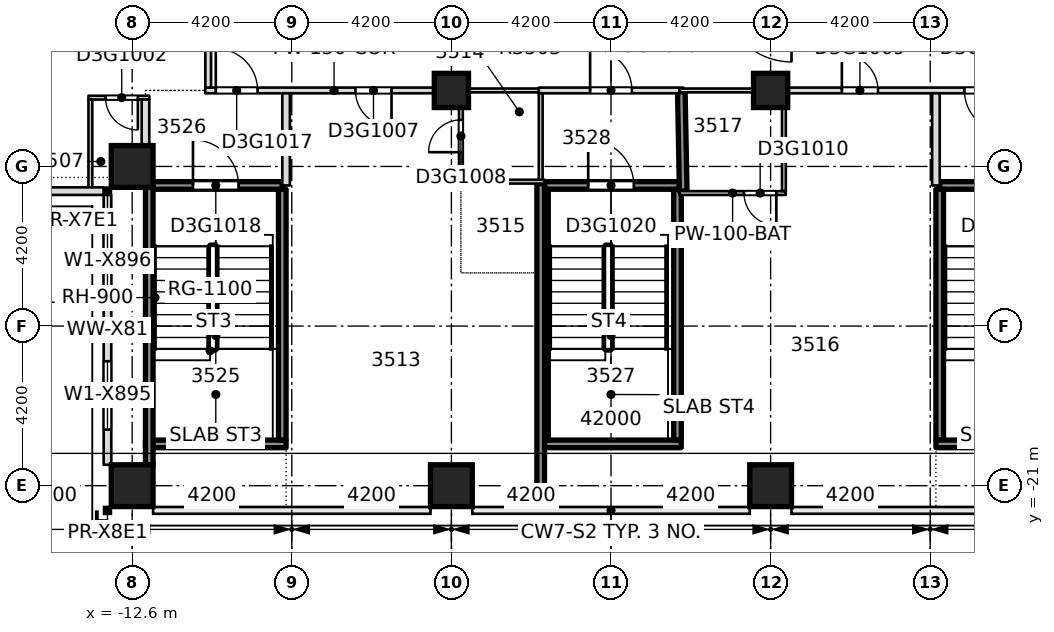
"""IFC4 building model, lengths in metres.
Left out: names, types, materials, properties, quantities, classifications, styles, units other than length and angle.
Written with IfcOpenShell. Run it as: python <this file> out.ifc"""

import sys

from ifc_helpers import new_model, si_unit, direction, frame, frame_2d, origin, origin_2d, place, context, subcontext, project, spatial, rectangle, extrude, element, fill, save


model = new_model("IFC4")
c1 = context("Model", 3, precision=1e-05, world=origin(), true_north=direction((0.0, 1.0)))
c2 = subcontext(c1, "Body", "Model", "MODEL_VIEW")
j1 = project(units=[si_unit("LENGTHUNIT", "METRE"), si_unit("PLANEANGLEUNIT", "RADIAN")], contexts=[c1])
p1 = place(None, origin())
s1 = spatial("IfcSite", under=j1, at=p1, CompositionType="ELEMENT")
p2 = place(p1, origin())
s2 = spatial("IfcBuilding", under=s1, at=p2, CompositionType="ELEMENT")
p3 = place(p2, frame((0.0, 0.0, 140.0)))
s3 = spatial("IfcBuildingStorey", under=s2, at=p3, CompositionType="ELEMENT", Elevation=140.0)
for number, where, z_axis, x_axis in (
    (1, (-12.6, -21.0, -0.4), (0.0, 0.0, 1.0), (1.0, 0.0, 0.0)),
    (2, (-4.2, -21.0, -0.4), (0.0, 0.0, 1.0), (1.0, 0.0, 0.0)),
    (3, (4.2, -21.0, -0.4), (0.0, 0.0, 1.0), (1.0, 0.0, 0.0)),
    (4, (-12.6, -12.6, -0.4), (0.0, 0.0, 1.0), (1.0, 0.0, 0.0)),
):
    element("IfcColumn", number, at=place(p3, frame(where, z_axis=z_axis, x_axis=x_axis)), inside=s3, PredefinedType="COLUMN", context=c2, shape_type="SweptSolid", body=[
        extrude(rectangle(XDim=1.1, YDim=1.1, at=origin_2d()), origin(), (0.0, 0.0, 1.0), 3.45),
    ])
for number, where, z_axis, x_axis in (
    (5, (-4.2, -10.6, -0.4), (0.0, 0.0, 1.0), (1.0, 0.0, 0.0)),
    (6, (4.2, -10.6, -0.4), (0.0, 0.0, 1.0), (1.0, 0.0, 0.0)),
):
    element("IfcColumn", number, at=place(p3, frame(where, z_axis=z_axis, x_axis=x_axis)), inside=s3, PredefinedType="COLUMN", context=c2, shape_type="SweptSolid", body=[
        extrude(rectangle(XDim=0.9, YDim=0.9, at=origin_2d()), origin(), (0.0, 0.0, 1.0), 3.45),
    ])
p4 = place(p3, frame((-1.848, -19.9, 0.0), z_axis=(0.0, 0.0, 1.0), x_axis=(1.0, 0.0, 0.0)))
e7 = element("IfcWall", 7, at=p4, inside=s3, PredefinedType="SOLIDWALL", context=c2, shape_type="SweptSolid", body=[
    extrude(rectangle(XDim=3.696, YDim=0.2, at=frame_2d((1.848, 0.0))), origin(), (0.0, 0.0, 1.0), 3.05),
])
p5 = place(p3, frame((1.802, -13.3, 0.0), z_axis=(0.0, 0.0, 1.0), x_axis=(1.0, 0.0, 0.0)))
e8 = element("IfcWall", 8, at=p5, inside=s3, PredefinedType="PARTITIONING", context=c2, shape_type="SweptSolid", body=[
    extrude(rectangle(XDim=2.796, YDim=0.1, at=frame_2d((1.398, 0.0))), origin(), (0.0, 0.0, 1.0), 3.05),
])
p6 = place(p5, frame((1.698, 0.0, 0.0)))
e9 = element("IfcOpeningElement", 9, at=p6, cuts=e8, PredefinedType="OPENING", context=c2, shape_type="SweptSolid", body=[
    extrude(rectangle(XDim=0.85, YDim=2.1, at=frame_2d((0.425, 1.05))), frame((0.0, 0.06, 0.0), z_axis=(0.0, -1.0, 0.0), x_axis=(1.0, 0.0, 0.0)), (0.0, 0.0, 1.0), 0.12),
])
p7 = place(p3, frame((-12.15, -13.1, 0.0), z_axis=(0.0, 0.0, 1.0), x_axis=(1.0, 0.0, 0.0)))
e10 = element("IfcWall", 10, at=p7, inside=s3, PredefinedType="SOLIDWALL", context=c2, shape_type="SweptSolid", body=[
    extrude(rectangle(XDim=3.5, YDim=0.2, at=frame_2d((1.75, 0.0))), origin(), (0.0, 0.0, 1.0), 3.05),
])
p8 = place(p7, frame((1.15, 0.0, 0.0)))
e11 = element("IfcOpeningElement", 11, at=p8, cuts=e10, PredefinedType="OPENING", context=c2, shape_type="SweptSolid", body=[
    extrude(rectangle(XDim=1.2, YDim=2.1, at=frame_2d((0.6, 1.05))), frame((0.0, 0.11, 0.0), z_axis=(0.0, -1.0, 0.0), x_axis=(1.0, 0.0, 0.0)), (0.0, 0.0, 1.0), 0.22),
])
p9 = place(p3, frame((-1.748, -13.1, 0.0), z_axis=(0.0, 0.0, 1.0), x_axis=(1.0, 0.0, 0.0)))
e12 = element("IfcWall", 12, at=p9, inside=s3, PredefinedType="SOLIDWALL", context=c2, shape_type="SweptSolid", body=[
    extrude(rectangle(XDim=3.546, YDim=0.2, at=frame_2d((1.773, 0.0))), origin(), (0.0, 0.0, 1.0), 3.05),
])
p10 = place(p9, frame((1.148, 0.0, 0.0)))
e13 = element("IfcOpeningElement", 13, at=p10, cuts=e12, PredefinedType="OPENING", context=c2, shape_type="SweptSolid", body=[
    extrude(rectangle(XDim=1.2, YDim=2.1, at=frame_2d((0.6, 1.05))), frame((0.0, 0.11, 0.0), z_axis=(0.0, -1.0, 0.0), x_axis=(1.0, 0.0, 0.0)), (0.0, 0.0, 1.0), 0.22),
])
p11 = place(p3, frame((8.65, -13.1, 0.0), z_axis=(0.0, 0.0, 1.0), x_axis=(1.0, 0.0, 0.0)))
e14 = element("IfcWall", 14, at=p11, inside=s3, PredefinedType="SOLIDWALL", context=c2, shape_type="SweptSolid", body=[
    extrude(rectangle(XDim=3.5, YDim=0.2, at=frame_2d((1.75, 0.0))), origin(), (0.0, 0.0, 1.0), 3.05),
])
p12 = place(p11, frame((1.15, 0.0, 0.0)))
e15 = element("IfcOpeningElement", 15, at=p12, cuts=e14, PredefinedType="OPENING", context=c2, shape_type="SweptSolid", body=[
    extrude(rectangle(XDim=1.2, YDim=2.1, at=frame_2d((0.6, 1.05))), frame((0.0, 0.11, 0.0), z_axis=(0.0, -1.0, 0.0), x_axis=(1.0, 0.0, 0.0)), (0.0, 0.0, 1.0), 0.22),
])
p13 = place(p3, frame((-4.0, -13.0, 0.0), z_axis=(0.0, 0.0, 1.0), x_axis=(1.0, 0.0, 0.0)))
e16 = element("IfcWall", 16, at=p13, inside=s3, PredefinedType="PARTITIONING", context=c2, shape_type="SweptSolid", body=[
    extrude(rectangle(XDim=2.25, YDim=0.1, at=frame_2d((1.125, 0.0))), origin(), (0.0, 0.0, 1.0), 3.05),
])
p14 = place(p3, frame((-13.75, -10.79, 0.0), z_axis=(0.0, 0.0, 1.0), x_axis=(1.0, 0.0, 0.0)))
e17 = element("IfcWall", 17, at=p14, inside=s3, PredefinedType="PARTITIONING", context=c2, shape_type="SweptSolid", body=[
    extrude(rectangle(XDim=1.6, YDim=0.1, at=frame_2d((0.8, 0.0))), origin(), (0.0, 0.0, 1.0), 3.05),
])
p15 = place(p14, frame((0.45, 0.0, 0.0)))
e18 = element("IfcOpeningElement", 18, at=p15, cuts=e17, PredefinedType="OPENING", context=c2, shape_type="SweptSolid", body=[
    extrude(rectangle(XDim=0.85, YDim=2.1, at=frame_2d((0.425, 1.05))), frame((0.0, 0.06, 0.0), z_axis=(0.0, -1.0, 0.0), x_axis=(1.0, 0.0, 0.0)), (0.0, 0.0, 1.0), 0.12),
])
p16 = place(p3, frame((-10.675, -10.6, 0.0), z_axis=(0.0, 0.0, 1.0), x_axis=(1.0, 0.0, 0.0)))
e19 = element("IfcWall", 19, at=p16, inside=s3, PredefinedType="PARTITIONING", context=c2, shape_type="SweptSolid", body=[
    extrude(rectangle(XDim=6.775, YDim=0.15, at=frame_2d((3.388, 0.0))), origin(), (0.0, 0.0, 1.0), 3.05),
])
p17 = place(p16, frame((3.95, 0.0, 0.0)))
e20 = element("IfcOpeningElement", 20, at=p17, cuts=e19, PredefinedType="OPENING", context=c2, shape_type="SweptSolid", body=[
    extrude(rectangle(XDim=0.95, YDim=2.1, at=frame_2d((0.475, 1.05))), frame((0.0, 0.085, 0.0), z_axis=(0.0, -1.0, 0.0), x_axis=(1.0, 0.0, 0.0)), (0.0, 0.0, 1.0), 0.17),
])
p18 = place(p16, frame((0.275, 0.0, 0.0)))
e21 = element("IfcOpeningElement", 21, at=p18, cuts=e19, PredefinedType="OPENING", context=c2, shape_type="SweptSolid", body=[
    extrude(rectangle(XDim=1.1, YDim=2.1, at=frame_2d((0.55, 1.05))), frame((0.0, 0.085, 0.0), z_axis=(0.0, -1.0, 0.0), x_axis=(1.0, 0.0, 0.0)), (0.0, 0.0, 1.0), 0.17),
])
p19 = place(p3, frame((-4.0, -10.6, 0.0), z_axis=(0.0, 0.0, 1.0), x_axis=(1.0, 0.0, 0.0)))
e22 = element("IfcWall", 22, at=p19, inside=s3, PredefinedType="PARTITIONING", context=c2, shape_type="SweptSolid", body=[
    extrude(rectangle(XDim=2.2, YDim=0.1, at=frame_2d((1.1, 0.0))), origin(), (0.0, 0.0, 1.0), 3.05),
])
p20 = place(p3, frame((-1.9, -10.6, 0.0), z_axis=(0.0, 0.0, 1.0), x_axis=(1.0, 0.0, 0.0)))
e23 = element("IfcWall", 23, at=p20, inside=s3, PredefinedType="PARTITIONING", context=c2, shape_type="SweptSolid", body=[
    extrude(rectangle(XDim=3.8, YDim=0.15, at=frame_2d((1.9, 0.0))), origin(), (0.0, 0.0, 1.0), 3.05),
])
p21 = place(p20, frame((1.35, 0.0, 0.0)))
e24 = element("IfcOpeningElement", 24, at=p21, cuts=e23, PredefinedType="OPENING", context=c2, shape_type="SweptSolid", body=[
    extrude(rectangle(XDim=1.1, YDim=2.1, at=frame_2d((0.55, 1.05))), frame((0.0, 0.085, 0.0), z_axis=(0.0, -1.0, 0.0), x_axis=(1.0, 0.0, 0.0)), (0.0, 0.0, 1.0), 0.17),
])
p22 = place(p3, frame((1.8, -10.6, 0.0), z_axis=(0.0, 0.0, 1.0), x_axis=(1.0, 0.0, 0.0)))
e25 = element("IfcWall", 25, at=p22, inside=s3, PredefinedType="PARTITIONING", context=c2, shape_type="SweptSolid", body=[
    extrude(rectangle(XDim=2.8, YDim=0.1, at=frame_2d((1.4, 0.0))), origin(), (0.0, 0.0, 1.0), 3.05),
])
p23 = place(p3, frame((4.5, -10.6, 0.0), z_axis=(0.0, 0.0, 1.0), x_axis=(1.0, 0.0, 0.0)))
e26 = element("IfcWall", 26, at=p23, inside=s3, PredefinedType="PARTITIONING", context=c2, shape_type="SweptSolid", body=[
    extrude(rectangle(XDim=6.1, YDim=0.15, at=frame_2d((3.05, 0.0))), origin(), (0.0, 0.0, 1.0), 3.05),
])
p24 = place(p23, frame((1.575, 0.0, 0.0)))
e27 = element("IfcOpeningElement", 27, at=p24, cuts=e26, PredefinedType="OPENING", context=c2, shape_type="SweptSolid", body=[
    extrude(rectangle(XDim=0.95, YDim=2.1, at=frame_2d((0.475, 1.05))), frame((0.0, 0.085, 0.0), z_axis=(0.0, -1.0, 0.0), x_axis=(1.0, 0.0, 0.0)), (0.0, 0.0, 1.0), 0.17),
])
p25 = place(p23, frame((4.8, 0.0, 0.0)))
e28 = element("IfcOpeningElement", 28, at=p25, cuts=e26, PredefinedType="OPENING", context=c2, shape_type="SweptSolid", body=[
    extrude(rectangle(XDim=1.1, YDim=2.1, at=frame_2d((0.55, 1.05))), frame((0.0, 0.085, 0.0), z_axis=(0.0, -1.0, 0.0), x_axis=(1.0, 0.0, 0.0)), (0.0, 0.0, 1.0), 0.17),
])
p26 = place(p3, frame((-13.7, -13.15, 0.0), z_axis=(0.0, 0.0, 1.0), x_axis=(0.0, 1.0, 0.0)))
e29 = element("IfcWall", 29, at=p26, inside=s3, PredefinedType="PARTITIONING", context=c2, shape_type="SweptSolid", body=[
    extrude(rectangle(XDim=2.31, YDim=0.1, at=frame_2d((1.155, 0.0))), origin(), (0.0, 0.0, 1.0), 3.05),
])
p27 = place(p3, frame((-12.25, -12.89, 0.0), z_axis=(0.0, 0.0, 1.0), x_axis=(0.0, 1.0, 0.0)))
e30 = element("IfcWall", 30, at=p27, inside=s3, PredefinedType="PARTITIONING", context=c2, shape_type="SweptSolid", body=[
    extrude(rectangle(XDim=2.05, YDim=0.2, at=frame_2d((1.025, 0.0))), origin(), (0.0, 0.0, 1.0), 3.05),
])
p28 = place(p3, frame((-10.6, -10.525, 0.0), z_axis=(0.0, 0.0, 1.0), x_axis=(0.0, 1.0, 0.0)))
e31 = element("IfcWall", 31, at=p28, inside=s3, PredefinedType="PARTITIONING", context=c2, shape_type="SweptSolid", body=[
    extrude(rectangle(XDim=13.875, YDim=0.15, at=frame_2d((6.938, 0.0))), origin(), (0.0, 0.0, 1.0), 3.05),
])
p29 = place(p28, frame((2.325, 0.0, 0.0)))
e32 = element("IfcOpeningElement", 32, at=p29, cuts=e31, PredefinedType="OPENING", context=c2, shape_type="SweptSolid", body=[
    extrude(rectangle(XDim=0.95, YDim=2.1, at=frame_2d((0.475, 1.05))), frame((0.0, 0.085, 0.0), z_axis=(0.0, -1.0, 0.0), x_axis=(1.0, 0.0, 0.0)), (0.0, 0.0, 1.0), 0.17),
])
p30 = place(p28, frame((9.975, 0.0, 0.0)))
e33 = element("IfcOpeningElement", 33, at=p30, cuts=e31, PredefinedType="OPENING", context=c2, shape_type="SweptSolid", body=[
    extrude(rectangle(XDim=1.1, YDim=2.1, at=frame_2d((0.55, 1.05))), frame((0.0, 0.085, 0.0), z_axis=(0.0, -1.0, 0.0), x_axis=(1.0, 0.0, 0.0)), (0.0, 0.0, 1.0), 0.17),
])
p31 = place(p28, frame((4.825, 0.0, 0.0)))
e34 = element("IfcOpeningElement", 34, at=p31, cuts=e31, PredefinedType="OPENING", context=c2, shape_type="SweptSolid", body=[
    extrude(rectangle(XDim=1.0, YDim=2.1, at=frame_2d((0.5, 1.05))), frame((0.0, 0.085, 0.0), z_axis=(0.0, -1.0, 0.0), x_axis=(1.0, 0.0, 0.0)), (0.0, 0.0, 1.0), 0.17),
])
p32 = place(p28, frame((12.225, 0.0, 0.0)))
e35 = element("IfcOpeningElement", 35, at=p32, cuts=e31, PredefinedType="OPENING", context=c2, shape_type="SweptSolid", body=[
    extrude(rectangle(XDim=1.0, YDim=2.1, at=frame_2d((0.5, 1.05))), frame((0.0, 0.085, 0.0), z_axis=(0.0, -1.0, 0.0), x_axis=(1.0, 0.0, 0.0)), (0.0, 0.0, 1.0), 0.17),
])
p33 = place(p3, frame((-8.55, -13.1, 0.0), z_axis=(0.0, 0.0, 1.0), x_axis=(0.0, 1.0, 0.0)))
e36 = element("IfcWall", 36, at=p33, inside=s3, PredefinedType="PARTITIONING", context=c2, shape_type="SweptSolid", body=[
    extrude(rectangle(XDim=2.425, YDim=0.2, at=frame_2d((1.212, 0.0))), origin(), (0.0, 0.0, 1.0), 3.05),
])
p34 = place(p3, frame((-3.95, -12.95, 0.0), z_axis=(0.0, 0.0, 1.0), x_axis=(0.0, 1.0, 0.0)))
e37 = element("IfcWall", 37, at=p34, inside=s3, PredefinedType="PARTITIONING", context=c2, shape_type="SweptSolid", body=[
    extrude(rectangle(XDim=2.275, YDim=0.1, at=frame_2d((1.137, 0.0))), origin(), (0.0, 0.0, 1.0), 3.05),
])
p35 = place(p34, frame((0.725, 0.0, 0.0)))
e38 = element("IfcOpeningElement", 38, at=p35, cuts=e37, PredefinedType="OPENING", context=c2, shape_type="SweptSolid", body=[
    extrude(rectangle(XDim=0.85, YDim=2.1, at=frame_2d((0.425, 1.05))), frame((0.0, 0.06, 0.0), z_axis=(0.0, -1.0, 0.0), x_axis=(1.0, 0.0, 0.0)), (0.0, 0.0, 1.0), 0.12),
])
p36 = place(p3, frame((-1.85, -12.95, 0.0), z_axis=(0.0, 0.0, 1.0), x_axis=(0.0, 1.0, 0.0)))
e39 = element("IfcWall", 39, at=p36, inside=s3, PredefinedType="PARTITIONING", context=c2, shape_type="SweptSolid", body=[
    extrude(rectangle(XDim=2.275, YDim=0.1, at=frame_2d((1.137, 0.0))), origin(), (0.0, 0.0, 1.0), 3.05),
])
for number, where, z_axis, x_axis in (
    (40, (-1.75, -19.798, 0.0), (0.0, 0.0, 1.0), (0.0, 1.0, 0.0)),
    (41, (1.75, -19.798, 0.0), (0.0, 0.0, 1.0), (0.0, 1.0, 0.0)),
):
    element("IfcWall", number, at=place(p3, frame(where, z_axis=z_axis, x_axis=x_axis)), inside=s3, PredefinedType="SOLIDWALL", context=c2, shape_type="SweptSolid", body=[
        extrude(rectangle(XDim=6.596, YDim=0.2, at=frame_2d((3.298, 0.0))), origin(), (0.0, 0.0, 1.0), 3.05),
    ])
p37 = place(p3, frame((1.9, -13.248, 0.0), z_axis=(0.0, 0.0, 1.0), x_axis=(-0.019076944695, 0.999818018532, 0.0)))
e42 = element("IfcWall", 42, at=p37, inside=s3, PredefinedType="SOLIDWALL", context=c2, shape_type="SweptSolid", body=[
    extrude(rectangle(XDim=2.624, YDim=0.2, at=frame_2d((1.312, 0.0))), origin(), (0.0, 0.0, 1.0), 3.05),
])
p38 = place(p3, frame((4.55, -13.248, 0.0), z_axis=(0.0, 0.0, 1.0), x_axis=(0.0, 1.0, 0.0)))
e43 = element("IfcWall", 43, at=p38, inside=s3, PredefinedType="PARTITIONING", context=c2, shape_type="SweptSolid", body=[
    extrude(rectangle(XDim=2.573, YDim=0.1, at=frame_2d((1.287, 0.0))), origin(), (0.0, 0.0, 1.0), 3.05),
])
p39 = place(p3, frame((8.55, -13.1, 0.0), z_axis=(0.0, 0.0, 1.0), x_axis=(0.0, 1.0, 0.0)))
e44 = element("IfcWall", 44, at=p39, inside=s3, PredefinedType="PARTITIONING", context=c2, shape_type="SweptSolid", body=[
    extrude(rectangle(XDim=2.425, YDim=0.2, at=frame_2d((1.212, 0.0))), origin(), (0.0, 0.0, 1.0), 3.05),
])
p40 = place(p3, frame((-20.45, -13.25, 0.0), z_axis=(0.0, 0.0, 1.0), x_axis=(1.0, 0.0, 0.0)))
e45 = element("IfcWall", 45, at=p40, inside=s3, PredefinedType="STANDARD", context=c2, shape_type="SweptSolid", body=[
    extrude(rectangle(XDim=7.1, YDim=0.2, at=frame_2d((3.55, 0.0))), origin(), (0.0, 0.0, 1.0), 3.05),
])
p41 = place(p3, frame((-13.25, -13.35, 0.0), z_axis=(0.0, 0.0, 1.0), x_axis=(0.0, -1.0, 0.0)))
e46 = element("IfcWall", 46, at=p41, inside=s3, PredefinedType="STANDARD", context=c2, shape_type="SweptSolid", body=[
    extrude(rectangle(XDim=7.1, YDim=0.2, at=frame_2d((3.55, 0.0))), origin(), (0.0, 0.0, 1.0), 3.05),
])
p42 = place(p41, frame((4.375, 0.0, 0.2)))
e47 = element("IfcOpeningElement", 47, at=p42, cuts=e46, PredefinedType="OPENING", context=c2, shape_type="SweptSolid", body=[
    extrude(rectangle(XDim=1.8, YDim=2.65, at=frame_2d((0.9, 1.325))), frame((0.0, 0.11, 0.0), z_axis=(0.0, -1.0, 0.0), x_axis=(1.0, 0.0, 0.0)), (0.0, 0.0, 1.0), 0.22),
])
p43 = place(p41, frame((0.825, 0.0, 0.2)))
e48 = element("IfcOpeningElement", 48, at=p43, cuts=e46, PredefinedType="OPENING", context=c2, shape_type="SweptSolid", body=[
    extrude(rectangle(XDim=1.8, YDim=2.65, at=frame_2d((0.9, 1.325))), frame((0.0, 0.11, 0.0), z_axis=(0.0, -1.0, 0.0), x_axis=(1.0, 0.0, 0.0)), (0.0, 0.0, 1.0), 0.22),
])
p44 = place(p3, frame((-12.25, -19.9, 0.0), z_axis=(0.0, 0.0, 1.0), x_axis=(1.0, 0.0, 0.0)))
e49 = element("IfcWall", 49, at=p44, inside=s3, PredefinedType="SOLIDWALL", context=c2, shape_type="SweptSolid", body=[
    extrude(rectangle(XDim=3.7, YDim=0.2, at=frame_2d((1.85, 0.0))), origin(), (0.0, 0.0, 1.0), 3.05),
])
for number, where, z_axis, x_axis in (
    (50, (-8.65, -19.8, 0.0), (0.0, 0.0, 1.0), (0.0, 1.0, 0.0)),
    (51, (8.65, -19.8, 0.0), (0.0, 0.0, 1.0), (0.0, 1.0, 0.0)),
):
    element("IfcWall", number, at=place(p3, frame(where, z_axis=z_axis, x_axis=x_axis)), inside=s3, PredefinedType="SOLIDWALL", context=c2, shape_type="SweptSolid", body=[
        extrude(rectangle(XDim=6.6, YDim=0.2, at=frame_2d((3.3, 0.0))), origin(), (0.0, 0.0, 1.0), 3.05),
    ])
p45 = place(p3, frame((-12.15, -20.45, 0.0), z_axis=(0.0, 0.0, 1.0), x_axis=(0.0, 1.0, 0.0)))
e52 = element("IfcWall", 52, at=p45, inside=s3, PredefinedType="SOLIDWALL", context=c2, shape_type="SweptSolid", body=[
    extrude(rectangle(XDim=7.3, YDim=0.2, at=frame_2d((3.65, 0.0))), origin(), (0.0, 0.0, 1.0), 3.05),
])
p46 = place(p3, frame((-1.85, -21.55, 0.0), z_axis=(0.0, 0.0, 1.0), x_axis=(0.0, 1.0, 0.0)))
e53 = element("IfcWall", 53, at=p46, inside=s3, PredefinedType="SOLIDWALL", context=c2, shape_type="SweptSolid", body=[
    extrude(rectangle(XDim=8.5, YDim=0.2, at=frame_2d((4.25, 0.0))), origin(), (0.0, 0.0, 1.0), 3.05),
])
p47 = place(p3, frame((8.55, -19.9, 0.0), z_axis=(0.0, 0.0, 1.0), x_axis=(1.0, 0.0, 0.0)))
e54 = element("IfcWall", 54, at=p47, inside=s3, PredefinedType="SOLIDWALL", context=c2, shape_type="SweptSolid", body=[
    extrude(rectangle(XDim=3.698, YDim=0.2, at=frame_2d((1.849, 0.0))), origin(), (0.0, 0.0, 1.0), 3.05),
])
p48 = place(p15, origin())
e55 = element("IfcDoor", 55, at=p48, inside=s3, OperationType="SINGLE_SWING_RIGHT", PredefinedType="DOOR", context=c2, shape_type="SweptSolid", body=[
    extrude(rectangle(XDim=0.85, YDim=2.1, at=frame_2d((0.425, 1.05))), frame((0.0, 0.025, 0.0), z_axis=(0.0, -1.0, 0.0), x_axis=(1.0, 0.0, 0.0)), (0.0, 0.0, 1.0), 0.05),
])
fill(e18, e55)
p49 = place(p17, origin())
e56 = element("IfcDoor", 56, at=p49, inside=s3, OperationType="SINGLE_SWING_RIGHT", PredefinedType="DOOR", context=c2, shape_type="SweptSolid", body=[
    extrude(rectangle(XDim=0.95, YDim=2.1, at=frame_2d((0.475, 1.05))), frame((0.0, 0.025, 0.0), z_axis=(0.0, -1.0, 0.0), x_axis=(1.0, 0.0, 0.0)), (0.0, 0.0, 1.0), 0.05),
])
fill(e20, e56)
p50 = place(p35, origin())
e57 = element("IfcDoor", 57, at=p50, inside=s3, OperationType="SINGLE_SWING_RIGHT", PredefinedType="DOOR", context=c2, shape_type="SweptSolid", body=[
    extrude(rectangle(XDim=0.85, YDim=2.1, at=frame_2d((0.425, 1.05))), frame((0.0, 0.025, 0.0), z_axis=(0.0, -1.0, 0.0), x_axis=(1.0, 0.0, 0.0)), (0.0, 0.0, 1.0), 0.05),
])
fill(e38, e57)
p51 = place(p24, origin())
e58 = element("IfcDoor", 58, at=p51, inside=s3, OperationType="SINGLE_SWING_LEFT", PredefinedType="DOOR", context=c2, shape_type="SweptSolid", body=[
    extrude(rectangle(XDim=0.95, YDim=2.1, at=frame_2d((0.475, 1.05))), frame((0.0, 0.025, 0.0), z_axis=(0.0, -1.0, 0.0), x_axis=(1.0, 0.0, 0.0)), (0.0, 0.0, 1.0), 0.05),
])
fill(e27, e58)
p52 = place(p6, origin())
e59 = element("IfcDoor", 59, at=p52, inside=s3, OperationType="SINGLE_SWING_RIGHT", PredefinedType="DOOR", context=c2, shape_type="SweptSolid", body=[
    extrude(rectangle(XDim=0.85, YDim=2.1, at=frame_2d((0.425, 1.05))), frame((0.0, 0.025, 0.0), z_axis=(0.0, -1.0, 0.0), x_axis=(1.0, 0.0, 0.0)), (0.0, 0.0, 1.0), 0.05),
])
fill(e9, e59)
p53 = place(p18, origin())
e60 = element("IfcDoor", 60, at=p53, inside=s3, OperationType="SINGLE_SWING_RIGHT", PredefinedType="DOOR", context=c2, shape_type="SweptSolid", body=[
    extrude(rectangle(XDim=1.1, YDim=2.1, at=frame_2d((0.55, 1.05))), frame((0.0, 0.025, 0.0), z_axis=(0.0, -1.0, 0.0), x_axis=(1.0, 0.0, 0.0)), (0.0, 0.0, 1.0), 0.05),
])
fill(e21, e60)
p54 = place(p8, origin())
e61 = element("IfcDoor", 61, at=p54, inside=s3, OperationType="SINGLE_SWING_RIGHT", PredefinedType="DOOR", context=c2, shape_type="SweptSolid", body=[
    extrude(rectangle(XDim=1.2, YDim=2.1, at=frame_2d((0.6, 1.05))), frame((0.0, 0.025, 0.0), z_axis=(0.0, -1.0, 0.0), x_axis=(1.0, 0.0, 0.0)), (0.0, 0.0, 1.0), 0.05),
])
fill(e11, e61)
p55 = place(p21, origin())
e62 = element("IfcDoor", 62, at=p55, inside=s3, OperationType="SINGLE_SWING_RIGHT", PredefinedType="DOOR", context=c2, shape_type="SweptSolid", body=[
    extrude(rectangle(XDim=1.1, YDim=2.1, at=frame_2d((0.55, 1.05))), frame((0.0, 0.025, 0.0), z_axis=(0.0, -1.0, 0.0), x_axis=(1.0, 0.0, 0.0)), (0.0, 0.0, 1.0), 0.05),
])
fill(e24, e62)
p56 = place(p10, origin())
e63 = element("IfcDoor", 63, at=p56, inside=s3, OperationType="SINGLE_SWING_RIGHT", PredefinedType="DOOR", context=c2, shape_type="SweptSolid", body=[
    extrude(rectangle(XDim=1.2, YDim=2.1, at=frame_2d((0.6, 1.05))), frame((0.0, 0.025, 0.0), z_axis=(0.0, -1.0, 0.0), x_axis=(1.0, 0.0, 0.0)), (0.0, 0.0, 1.0), 0.05),
])
fill(e13, e63)
p57 = place(p25, origin())
e64 = element("IfcDoor", 64, at=p57, inside=s3, OperationType="SINGLE_SWING_RIGHT", PredefinedType="DOOR", context=c2, shape_type="SweptSolid", body=[
    extrude(rectangle(XDim=1.1, YDim=2.1, at=frame_2d((0.55, 1.05))), frame((0.0, 0.025, 0.0), z_axis=(0.0, -1.0, 0.0), x_axis=(1.0, 0.0, 0.0)), (0.0, 0.0, 1.0), 0.05),
])
fill(e28, e64)
p58 = place(p42, origin())
e65 = element("IfcWindow", 65, at=p58, inside=s3, PartitioningType="SINGLE_PANEL", PredefinedType="WINDOW", context=c2, shape_type="SweptSolid", body=[
    extrude(rectangle(XDim=1.8, YDim=2.65, at=frame_2d((0.9, 1.325))), frame((0.0, 0.03, 0.0), z_axis=(0.0, -1.0, 0.0), x_axis=(1.0, 0.0, 0.0)), (0.0, 0.0, 1.0), 0.06),
])
fill(e47, e65)
p59 = place(p43, origin())
e66 = element("IfcWindow", 66, at=p59, inside=s3, PartitioningType="SINGLE_PANEL", PredefinedType="WINDOW", context=c2, shape_type="SweptSolid", body=[
    extrude(rectangle(XDim=1.8, YDim=2.65, at=frame_2d((0.9, 1.325))), frame((0.0, 0.03, 0.0), z_axis=(0.0, -1.0, 0.0), x_axis=(1.0, 0.0, 0.0)), (0.0, 0.0, 1.0), 0.06),
])
fill(e48, e66)
save(model, sys.argv[1])
